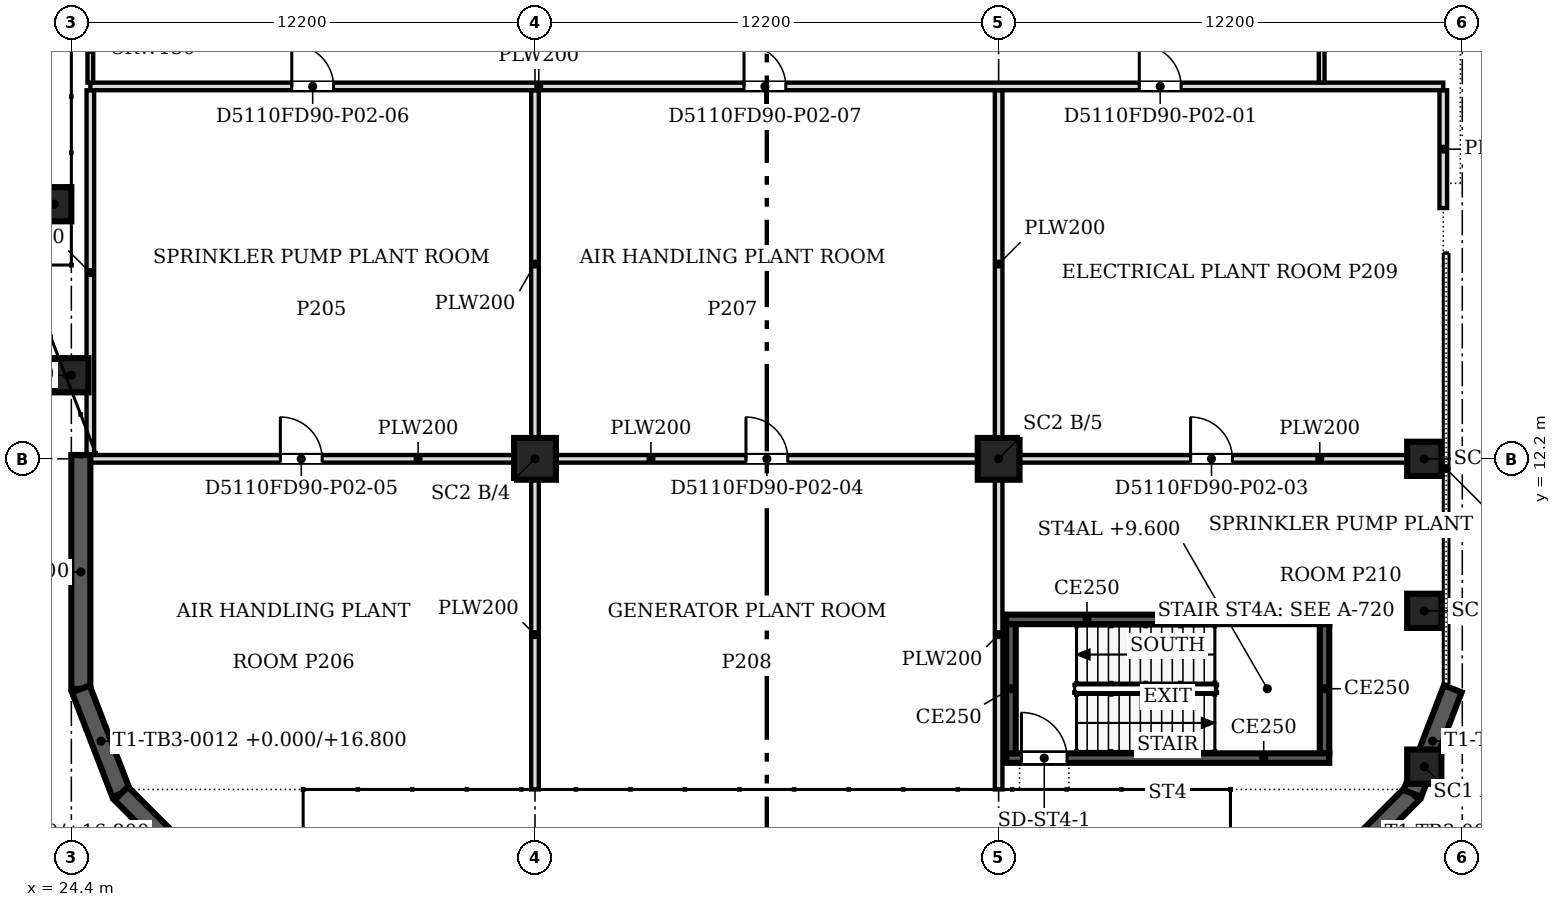
"""IFC4 building model, lengths in metres.
Left out: names, types, materials, properties, quantities, classifications, styles, units other than length and angle.
Written with IfcOpenShell. Run it as: python <this file> out.ifc"""

import sys

from ifc_helpers import new_model, si_unit, direction, frame, frame_2d, origin, origin_2d, place, context, subcontext, project, spatial, rectangle, extrude, faceted_brep, source, transform, mapped, element, fill, save


model = new_model("IFC4")
c1 = context("Model", 3, precision=1e-05, world=origin(), true_north=direction((0.0, 1.0)))
c2 = subcontext(c1, "Body", "Model", "MODEL_VIEW")
j1 = project(units=[si_unit("LENGTHUNIT", "METRE"), si_unit("PLANEANGLEUNIT", "RADIAN")], contexts=[c1])
p1 = place(None, origin())
s1 = spatial("IfcSite", under=j1, at=p1, CompositionType="ELEMENT")
p2 = place(p1, origin())
s2 = spatial("IfcBuilding", under=s1, at=p2, CompositionType="ELEMENT")
p3 = place(p2, frame((0.0, 0.0, 7.2)))
s3 = spatial("IfcBuildingStorey", under=s2, at=p3, CompositionType="ELEMENT", Elevation=7.2)
for number, where, z_axis, x_axis in (
    (1, (36.6, 12.2, 0.0), (0.0, 0.0, 1.0), (1.0, 0.0, 0.0)),
    (2, (48.8, 12.2, 0.0), (0.0, 0.0, 1.0), (1.0, 0.0, 0.0)),
):
    element("IfcColumn", number, at=place(p3, frame(where, z_axis=z_axis, x_axis=x_axis)), inside=s3, PredefinedType="COLUMN", context=c2, shape_type="SweptSolid", body=[
        extrude(rectangle(XDim=1.1, YDim=1.1, at=origin_2d()), origin(), (0.0, 0.0, 1.0), 4.55),
    ])
for number, where, z_axis, x_axis in (
    (3, (61.0, 19.0, 0.0), (0.0, 0.0, 1.0), (1.0, 0.0, 0.0)),
    (4, (60.0, 12.2, 0.0), (0.0, 0.0, 1.0), (1.0, 0.0, 0.0)),
    (5, (24.4, 14.4, 0.0), (0.0, 0.0, 1.0), (1.0, 0.0, 0.0)),
    (6, (60.0, 8.2, 0.0), (0.0, 0.0, 1.0), (1.0, 0.0, 0.0)),
    (7, (60.0, 4.1, 0.0), (0.0, 0.0, 1.0), (1.0, 0.0, 0.0)),
    (8, (61.0, 18.1, 0.0), (0.0, 0.0, 1.0), (1.0, 0.0, 0.0)),
    (9, (23.95, 18.9, 0.0), (0.0, 0.0, 1.0), (1.0, 0.0, 0.0)),
):
    element("IfcColumn", number, at=place(p3, frame(where, z_axis=z_axis, x_axis=x_axis)), inside=s3, PredefinedType="COLUMN", context=c2, shape_type="SweptSolid", body=[
        extrude(rectangle(XDim=0.9, YDim=0.9, at=origin_2d()), origin(), (0.0, 0.0, 1.0), 4.55),
    ])
m1 = source(origin(), c2, "Body", "Brep", [
    faceted_brep([(0.0, -0.25, 0.0), (6.155, -0.25, 0.0), (6.155, -0.25, 16.8), (0.0, -0.25, 16.8), (0.0, 0.25, 16.8), (6.108, 0.25, 16.8), (6.108, 0.25, 0.0), (0.0, 0.25, 0.0), (6.155, -0.0, 0.0), (6.155, -0.0, 16.8)], [[[0, 1, 2, 3]], [[4, 5, 6, 7]], [[7, 6, 8, 1, 0]], [[9, 2, 1, 8]], [[5, 4, 3, 2, 9]], [[4, 7, 0, 3]], [[8, 6, 5, 9]]]),
])
p4 = place(p3, frame((24.65, 12.301, -7.2), z_axis=(0.0, 0.0, 1.0), x_axis=(0.0, -1.0, 0.0)))
e10 = element("IfcWall", 10, at=p4, inside=s3, PredefinedType="SOLIDWALL", context=c2, shape_type="MappedRepresentation", body=[
    mapped(m1, transform((0.0, 0.0, 0.0), scale=1.0)),
])
m2 = source(origin(), c2, "Body", "Brep", [
    faceted_brep([(0.0, -0.25, 0.0), (2.944, -0.25, 0.0), (2.944, -0.25, 16.8), (0.0, -0.25, 16.8), (0.053, 0.25, 16.8), (2.891, 0.25, 16.8), (2.891, 0.25, 0.0), (0.053, 0.25, 0.0), (2.944, 0.0, 0.0), (0.0, 0.0, 0.0), (2.944, 0.0, 16.8), (0.0, 0.0, 16.8)], [[[0, 1, 2, 3]], [[4, 5, 6, 7]], [[7, 6, 8, 1, 0, 9]], [[10, 2, 1, 8]], [[5, 4, 11, 3, 2, 10]], [[9, 0, 3, 11]], [[7, 9, 11, 4]], [[8, 6, 5, 10]]]),
])
p5 = place(p3, frame((57.606, 1.312, -7.2), z_axis=(0.0, 0.0, 1.0), x_axis=(0.707106781187, 0.707106781187, 0.0)))
e11 = element("IfcWall", 11, at=p5, inside=s3, PredefinedType="SOLIDWALL", context=c2, shape_type="MappedRepresentation", body=[
    mapped(m2, transform((0.0, 0.0, 0.0), scale=1.0)),
])
m3 = source(origin(), c2, "Body", "Brep", [
    faceted_brep([(0.0, -0.25, 0.0), (2.95, -0.25, 0.0), (2.95, -0.25, 16.8), (0.0, -0.25, 16.8), (0.053, 0.25, 16.8), (2.904, 0.25, 16.8), (2.904, 0.25, 0.0), (0.053, 0.25, 0.0), (2.95, 0.0, 0.0), (0.0, 0.0, 0.0), (2.95, 0.0, 16.8), (0.0, 0.0, 16.8)], [[[0, 1, 2, 3]], [[4, 5, 6, 7]], [[7, 6, 8, 1, 0, 9]], [[10, 2, 1, 8]], [[5, 4, 11, 3, 2, 10]], [[9, 0, 3, 11]], [[7, 9, 11, 4]], [[8, 6, 5, 10]]]),
])
p6 = place(p3, frame((59.688, 3.394, -7.2), z_axis=(0.0, 0.0, 1.0), x_axis=(0.359949242603, 0.932971887438, 0.0)))
e12 = element("IfcWall", 12, at=p6, inside=s3, PredefinedType="SOLIDWALL", context=c2, shape_type="MappedRepresentation", body=[
    mapped(m3, transform((0.0, 0.0, 0.0), scale=1.0)),
])
m4 = source(origin(), c2, "Body", "Brep", [
    faceted_brep([(0.0, -0.25, 0.0), (2.95, -0.25, 0.0), (2.95, -0.25, 16.8), (0.0, -0.25, 16.8), (0.047, 0.25, 16.8), (2.898, 0.25, 16.8), (2.898, 0.25, 0.0), (0.047, 0.25, 0.0), (2.95, 0.0, 0.0), (0.0, 0.0, 0.0), (2.95, 0.0, 16.8), (0.0, 0.0, 16.8)], [[[0, 1, 2, 3]], [[4, 5, 6, 7]], [[7, 6, 8, 1, 0, 9]], [[10, 2, 1, 8]], [[5, 4, 11, 3, 2, 10]], [[9, 0, 3, 11]], [[7, 9, 11, 4]], [[8, 6, 5, 10]]]),
])
p7 = place(p3, frame((24.65, 6.146, -7.2), z_axis=(0.0, 0.0, 1.0), x_axis=(0.359949242603, -0.932971887438, 0.0)))
e13 = element("IfcWall", 13, at=p7, inside=s3, PredefinedType="SOLIDWALL", context=c2, shape_type="MappedRepresentation", body=[
    mapped(m4, transform((0.0, 0.0, 0.0), scale=1.0)),
])
p8 = place(p3, frame((25.712, 3.394, -7.2), z_axis=(0.0, 0.0, 1.0), x_axis=(0.707106781187, -0.707106781187, 0.0)))
e14 = element("IfcWall", 14, at=p8, inside=s3, PredefinedType="SOLIDWALL", context=c2, shape_type="MappedRepresentation", body=[
    mapped(m2, transform((0.0, 0.0, 0.0), scale=1.0)),
])
p9 = place(p3, frame((57.5, 4.325, 0.0), z_axis=(0.0, 0.0, 1.0), x_axis=(-1.0, 0.0, 0.0)))
e15 = element("IfcWall", 15, at=p9, inside=s3, PredefinedType="SOLIDWALL", context=c2, shape_type="SweptSolid", body=[
    extrude(rectangle(XDim=8.5, YDim=0.25, at=frame_2d((4.25, 0.0))), origin(), (0.0, 0.0, 1.0), 4.8),
])
m5 = source(origin(), c2, "Body", "SweptSolid", [
    extrude(rectangle(XDim=1.2, YDim=2.1, at=frame_2d((0.6, 1.05))), frame((0.0, 0.135, 0.0), z_axis=(0.0, -1.0, 0.0), x_axis=(1.0, 0.0, 0.0)), (0.0, 0.0, 1.0), 0.27),
])
p10 = place(p9, frame((6.9, 0.0, 0.0)))
e16 = element("IfcOpeningElement", 16, at=p10, cuts=e15, PredefinedType="OPENING", context=c2, shape_type="MappedRepresentation", body=[
    mapped(m5, transform((0.0, 0.0, 0.0), scale=1.0)),
])
p11 = place(p3, frame((49.125, 4.45, 0.0), z_axis=(0.0, 0.0, 1.0), x_axis=(0.0, 1.0, 0.0)))
e17 = element("IfcWall", 17, at=p11, inside=s3, PredefinedType="SOLIDWALL", context=c2, shape_type="SweptSolid", body=[
    extrude(rectangle(XDim=3.4, YDim=0.25, at=frame_2d((1.7, 0.0))), origin(), (0.0, 0.0, 1.0), 4.8),
])
p12 = place(p3, frame((49.0, 7.975, 0.0), z_axis=(0.0, 0.0, 1.0), x_axis=(1.0, 0.0, 0.0)))
e18 = element("IfcWall", 18, at=p12, inside=s3, PredefinedType="SOLIDWALL", context=c2, shape_type="SweptSolid", body=[
    extrude(rectangle(XDim=8.5, YDim=0.25, at=frame_2d((4.25, 0.0))), origin(), (0.0, 0.0, 1.0), 4.8),
])
p13 = place(p3, frame((57.375, 7.85, 0.0), z_axis=(0.0, 0.0, 1.0), x_axis=(0.0, -1.0, 0.0)))
e19 = element("IfcWall", 19, at=p13, inside=s3, PredefinedType="SOLIDWALL", context=c2, shape_type="SweptSolid", body=[
    extrude(rectangle(XDim=3.4, YDim=0.25, at=frame_2d((1.7, 0.0))), origin(), (0.0, 0.0, 1.0), 4.8),
])
for number, where, z_axis, x_axis in (
    (20, (36.6, 3.5, 0.0), (0.0, 0.0, 1.0), (0.0, 1.0, 0.0)),
    (21, (48.8, 3.5, 0.0), (0.0, 0.0, 1.0), (0.0, 1.0, 0.0)),
):
    element("IfcWall", number, at=place(p3, frame(where, z_axis=z_axis, x_axis=x_axis)), inside=s3, PredefinedType="PARTITIONING", context=c2, shape_type="SweptSolid", body=[
        extrude(rectangle(XDim=8.149, YDim=0.2, at=frame_2d((4.074, 0.0))), origin(), (0.0, 0.0, 1.0), 3.715),
    ])
p14 = place(p3, frame((36.049, 12.2, 0.0), z_axis=(0.0, 0.0, 1.0), x_axis=(-1.0, 0.0, 0.0)))
e22 = element("IfcWall", 22, at=p14, inside=s3, PredefinedType="PARTITIONING", context=c2, shape_type="SweptSolid", body=[
    extrude(rectangle(XDim=11.149, YDim=0.2, at=frame_2d((5.575, 0.0))), origin(), (0.0, 0.0, 1.0), 3.715),
])
m6 = source(origin(), c2, "Body", "SweptSolid", [
    extrude(rectangle(XDim=1.1, YDim=2.1, at=frame_2d((0.55, 1.05))), frame((0.0, 0.11, 0.0), z_axis=(0.0, -1.0, 0.0), x_axis=(1.0, 0.0, 0.0)), (0.0, 0.0, 1.0), 0.22),
])
p15 = place(p14, frame((5.049, 0.0, 0.0)))
e23 = element("IfcOpeningElement", 23, at=p15, cuts=e22, PredefinedType="OPENING", context=c2, shape_type="MappedRepresentation", body=[
    mapped(m6, transform((0.0, 0.0, 0.0), scale=1.0)),
])
p16 = place(p3, frame((48.249, 12.2, 0.0), z_axis=(0.0, 0.0, 1.0), x_axis=(-1.0, 0.0, 0.0)))
e24 = element("IfcWall", 24, at=p16, inside=s3, PredefinedType="PARTITIONING", context=c2, shape_type="SweptSolid", body=[
    extrude(rectangle(XDim=11.098, YDim=0.2, at=frame_2d((5.549, 0.0))), origin(), (0.0, 0.0, 1.0), 3.715),
])
p17 = place(p16, frame((4.998, 0.0, 0.0)))
e25 = element("IfcOpeningElement", 25, at=p17, cuts=e24, PredefinedType="OPENING", context=c2, shape_type="MappedRepresentation", body=[
    mapped(m6, transform((0.0, 0.0, 0.0), scale=1.0)),
])
p18 = place(p3, frame((59.549, 12.2, 0.0), z_axis=(0.0, 0.0, 1.0), x_axis=(-1.0, 0.0, 0.0)))
e26 = element("IfcWall", 26, at=p18, inside=s3, PredefinedType="PARTITIONING", context=c2, shape_type="SweptSolid", body=[
    extrude(rectangle(XDim=10.198, YDim=0.2, at=frame_2d((5.099, 0.0))), origin(), (0.0, 0.0, 1.0), 3.715),
])
p19 = place(p18, frame((4.598, 0.0, 0.0)))
e27 = element("IfcOpeningElement", 27, at=p19, cuts=e26, PredefinedType="OPENING", context=c2, shape_type="MappedRepresentation", body=[
    mapped(m6, transform((0.0, 0.0, 0.0), scale=1.0)),
])
p20 = place(p3, frame((24.9, 12.301, 0.0), z_axis=(0.0, 0.0, 1.0), x_axis=(0.0, 1.0, 0.0)))
e28 = element("IfcWall", 28, at=p20, inside=s3, PredefinedType="PARTITIONING", context=c2, shape_type="SweptSolid", body=[
    extrude(rectangle(XDim=9.598, YDim=0.2, at=frame_2d((4.799, 0.0))), origin(), (0.0, 0.0, 1.0), 3.715),
])
for number, where, z_axis, x_axis in (
    (29, (36.6, 12.751, 0.0), (0.0, 0.0, 1.0), (0.0, 1.0, 0.0)),
    (30, (48.8, 12.751, 0.0), (0.0, 0.0, 1.0), (0.0, 1.0, 0.0)),
):
    element("IfcWall", number, at=place(p3, frame(where, z_axis=z_axis, x_axis=x_axis)), inside=s3, PredefinedType="PARTITIONING", context=c2, shape_type="SweptSolid", body=[
        extrude(rectangle(XDim=9.148, YDim=0.2, at=frame_2d((4.574, 0.0))), origin(), (0.0, 0.0, 1.0), 3.715),
    ])
p21 = place(p3, frame((60.5, 18.8, 0.0), z_axis=(0.0, 0.0, 1.0), x_axis=(0.0, 1.0, 0.0)))
e31 = element("IfcWall", 31, at=p21, inside=s3, PredefinedType="PARTITIONING", context=c2, shape_type="SweptSolid", body=[
    extrude(rectangle(XDim=3.099, YDim=0.2, at=frame_2d((1.549, 0.0))), origin(), (0.0, 0.0, 1.0), 3.715),
])
p22 = place(p3, frame((61.0, 19.451, 0.0), z_axis=(0.0, 0.0, 1.0), x_axis=(0.0, 1.0, 0.0)))
e32 = element("IfcWall", 32, at=p22, inside=s3, PredefinedType="PARTITIONING", context=c2, shape_type="SweptSolid", body=[
    extrude(rectangle(XDim=4.168, YDim=0.1, at=frame_2d((2.084, 0.0))), origin(), (0.0, 0.0, 1.0), 3.715),
])
p23 = place(p3, frame((60.5, 22.0, 0.0), z_axis=(0.0, 0.0, 1.0), x_axis=(-1.0, 0.0, 0.0)))
e33 = element("IfcWall", 33, at=p23, inside=s3, PredefinedType="PARTITIONING", context=c2, shape_type="SweptSolid", body=[
    extrude(rectangle(XDim=35.6, YDim=0.2, at=frame_2d((17.8, 0.0))), origin(), (0.0, 0.0, 1.0), 3.715),
])
p24 = place(p23, frame((6.899, 0.0, 0.0)))
e34 = element("IfcOpeningElement", 34, at=p24, cuts=e33, PredefinedType="OPENING", context=c2, shape_type="MappedRepresentation", body=[
    mapped(m6, transform((0.0, 0.0, 0.0), scale=1.0)),
])
p25 = place(p23, frame((29.2, 0.0, 0.0)))
e35 = element("IfcOpeningElement", 35, at=p25, cuts=e33, PredefinedType="OPENING", context=c2, shape_type="MappedRepresentation", body=[
    mapped(m6, transform((0.0, 0.0, 0.0), scale=1.0)),
])
p26 = place(p23, frame((17.3, 0.0, 0.0)))
e36 = element("IfcOpeningElement", 36, at=p26, cuts=e33, PredefinedType="OPENING", context=c2, shape_type="MappedRepresentation", body=[
    mapped(m6, transform((0.0, 0.0, 0.0), scale=1.0)),
])
p27 = place(p3, frame((24.9, 22.101, 0.0), z_axis=(0.0, 0.0, 1.0), x_axis=(0.0, 1.0, 0.0)))
e37 = element("IfcWall", 37, at=p27, inside=s3, PredefinedType="PARTITIONING", context=c2, shape_type="SweptSolid", body=[
    extrude(rectangle(XDim=1.748, YDim=0.15, at=frame_2d((0.874, 0.0))), origin(), (0.0, 0.0, 1.0), 3.715),
])
p28 = place(p3, frame((57.3, 22.101, 0.0), z_axis=(0.0, 0.0, 1.0), x_axis=(0.0, 1.0, 0.0)))
e38 = element("IfcWall", 38, at=p28, inside=s3, PredefinedType="PARTITIONING", context=c2, shape_type="SweptSolid", body=[
    extrude(rectangle(XDim=8.499, YDim=0.15, at=frame_2d((4.25, 0.0))), origin(), (0.0, 0.0, 1.0), 3.715),
])
m7 = source(origin(), c2, "Body", "SweptSolid", [
    extrude(rectangle(XDim=1.2, YDim=2.1, at=frame_2d((0.6, 1.05))), frame((0.0, 0.025, 0.0), z_axis=(0.0, -1.0, 0.0), x_axis=(1.0, 0.0, 0.0)), (0.0, 0.0, 1.0), 0.05),
])
p29 = place(p10, origin())
e39 = element("IfcDoor", 39, at=p29, inside=s3, OperationType="SINGLE_SWING_RIGHT", PredefinedType="DOOR", context=c2, shape_type="MappedRepresentation", body=[
    mapped(m7, transform((0.0, 0.0, 0.0), scale=1.0)),
])
fill(e16, e39)
m8 = source(origin(), c2, "Body", "SweptSolid", [
    extrude(rectangle(XDim=1.1, YDim=2.1, at=frame_2d((0.55, 1.05))), frame((0.0, 0.025, 0.0), z_axis=(0.0, -1.0, 0.0), x_axis=(1.0, 0.0, 0.0)), (0.0, 0.0, 1.0), 0.05),
])
p30 = place(p24, origin())
e40 = element("IfcDoor", 40, at=p30, inside=s3, OperationType="SINGLE_SWING_RIGHT", PredefinedType="DOOR", context=c2, shape_type="MappedRepresentation", body=[
    mapped(m8, transform((0.0, 0.0, 0.0), scale=1.0)),
])
fill(e34, e40)
p31 = place(p19, origin())
e41 = element("IfcDoor", 41, at=p31, inside=s3, OperationType="SINGLE_SWING_RIGHT", PredefinedType="DOOR", context=c2, shape_type="MappedRepresentation", body=[
    mapped(m8, transform((0.0, 0.0, 0.0), scale=1.0)),
])
fill(e27, e41)
p32 = place(p17, origin())
e42 = element("IfcDoor", 42, at=p32, inside=s3, OperationType="SINGLE_SWING_RIGHT", PredefinedType="DOOR", context=c2, shape_type="MappedRepresentation", body=[
    mapped(m8, transform((0.0, 0.0, 0.0), scale=1.0)),
])
fill(e25, e42)
p33 = place(p15, origin())
e43 = element("IfcDoor", 43, at=p33, inside=s3, OperationType="SINGLE_SWING_RIGHT", PredefinedType="DOOR", context=c2, shape_type="MappedRepresentation", body=[
    mapped(m8, transform((0.0, 0.0, 0.0), scale=1.0)),
])
fill(e23, e43)
p34 = place(p25, origin())
e44 = element("IfcDoor", 44, at=p34, inside=s3, OperationType="SINGLE_SWING_RIGHT", PredefinedType="DOOR", context=c2, shape_type="MappedRepresentation", body=[
    mapped(m8, transform((0.0, 0.0, 0.0), scale=1.0)),
])
fill(e35, e44)
p35 = place(p26, origin())
e45 = element("IfcDoor", 45, at=p35, inside=s3, OperationType="SINGLE_SWING_RIGHT", PredefinedType="DOOR", context=c2, shape_type="MappedRepresentation", body=[
    mapped(m8, transform((0.0, 0.0, 0.0), scale=1.0)),
])
fill(e36, e45)
save(model, sys.argv[1])
